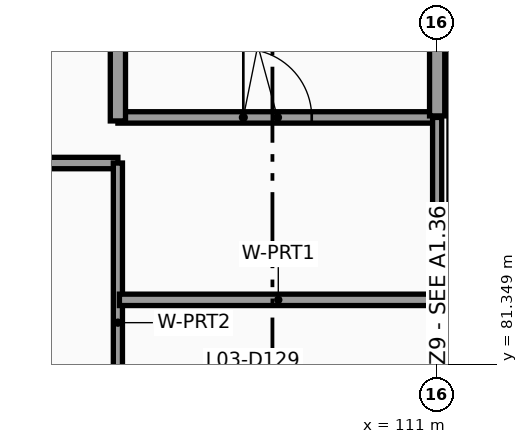
"""IFC4 building model, lengths in metres.
Left out: names, types, materials, properties, quantities, classifications, styles, units other than length and angle.
Written with IfcOpenShell. Run it as: python <this file> out.ifc"""

import sys

from ifc_helpers import new_model, si_unit, direction, frame, frame_2d, origin, place, context, subcontext, project, spatial, rectangle, extrude, element, fill, save


model = new_model("IFC4")
c1 = context("Model", 3, precision=1e-05, world=origin(), true_north=direction((0.0, 1.0)))
c2 = subcontext(c1, "Body", "Model", "MODEL_VIEW")
j1 = project(units=[si_unit("LENGTHUNIT", "METRE"), si_unit("PLANEANGLEUNIT", "RADIAN")], contexts=[c1])
p1 = place(None, origin())
s1 = spatial("IfcSite", under=j1, at=p1, CompositionType="ELEMENT")
p2 = place(p1, origin())
s2 = spatial("IfcBuilding", under=s1, at=p2, CompositionType="ELEMENT")
p3 = place(p2, frame((0.0, 0.0, 11.4)))
s3 = spatial("IfcBuildingStorey", under=s2, at=p3, CompositionType="ELEMENT", Elevation=11.4)
p4 = place(p3, frame((102.6, 84.0, 0.0), z_axis=(0.0, 0.0, 1.0), x_axis=(1.0, 0.0, 0.0)))
e1 = element("IfcWall", 1, at=p4, inside=s3, PredefinedType="PARTITIONING", context=c2, shape_type="SweptSolid", body=[
    extrude(rectangle(XDim=4.2, YDim=0.15, at=frame_2d((2.1, 0.0))), origin(), (0.0, 0.0, 1.0), 2.94),
])
p5 = place(p4, frame((1.15, 0.0, 0.0)))
e2 = element("IfcOpeningElement", 2, at=p5, cuts=e1, PredefinedType="OPENING", context=c2, shape_type="SweptSolid", body=[
    extrude(rectangle(XDim=1.9, YDim=2.3, at=frame_2d((0.95, 1.15))), frame((0.0, 0.085, 0.0), z_axis=(0.0, -1.0, 0.0), x_axis=(1.0, 0.0, 0.0)), (0.0, 0.0, 1.0), 0.17),
])
p6 = place(p3, frame((106.8, 84.0, 0.0), z_axis=(0.0, 0.0, 1.0), x_axis=(0.0, -1.0, 0.0)))
e3 = element("IfcWall", 3, at=p6, inside=s3, PredefinedType="PARTITIONING", context=c2, shape_type="SweptSolid", body=[
    extrude(rectangle(XDim=4.2, YDim=0.12, at=frame_2d((2.1, 0.0))), origin(), (0.0, 0.0, 1.0), 2.59),
])
p7 = place(p3, frame((106.82, 82.2, 0.0), z_axis=(0.0, 0.0, 1.0), x_axis=(1.0, 0.0, 0.0)))
e4 = element("IfcWall", 4, at=p7, inside=s3, PredefinedType="PARTITIONING", context=c2, shape_type="SweptSolid", body=[
    extrude(rectangle(XDim=4.18, YDim=0.15, at=frame_2d((2.09, 0.0))), origin(), (0.0, 0.0, 1.0), 2.98),
])
p8 = place(p3, frame((111.0, 82.2, 0.0), z_axis=(0.0, 0.0, 1.0), x_axis=(0.0, -1.0, 0.0)))
e5 = element("IfcWall", 5, at=p8, inside=s3, PredefinedType="PARTITIONING", context=c2, shape_type="SweptSolid", body=[
    extrude(rectangle(XDim=2.127, YDim=0.12, at=frame_2d((1.063, 0.0))), origin(), (0.0, 0.0, 1.0), 2.98),
])
p9 = place(p3, frame((106.8, 84.6, 0.0), z_axis=(0.0, 0.0, 1.0), x_axis=(1.0, 0.0, 0.0)))
e6 = element("IfcWall", 6, at=p9, inside=s3, PredefinedType="PARTITIONING", context=c2, shape_type="SweptSolid", body=[
    extrude(rectangle(XDim=4.2, YDim=0.15, at=frame_2d((2.1, 0.0))), origin(), (0.0, 0.0, 1.0), 2.98),
])
p10 = place(p9, frame((1.65, 0.0, 0.0)))
e7 = element("IfcOpeningElement", 7, at=p10, cuts=e6, PredefinedType="OPENING", context=c2, shape_type="SweptSolid", body=[
    extrude(rectangle(XDim=0.9, YDim=2.05, at=frame_2d((0.45, 1.025))), frame((0.0, 0.085, 0.0), z_axis=(0.0, -1.0, 0.0), x_axis=(1.0, 0.0, 0.0)), (0.0, 0.0, 1.0), 0.17),
])
p11 = place(p3, frame((111.0, 84.6, 0.0), z_axis=(0.0, 0.0, 1.0), x_axis=(0.0, -1.0, 0.0)))
e8 = element("IfcWall", 8, at=p11, inside=s3, PredefinedType="PARTITIONING", context=c2, shape_type="SweptSolid", body=[
    extrude(rectangle(XDim=2.38, YDim=0.12, at=frame_2d((1.19, 0.0))), origin(), (0.0, 0.0, 1.0), 2.98),
])
p12 = place(p3, frame((106.8, 88.2, 0.0), z_axis=(0.0, 0.0, 1.0), x_axis=(0.0, -1.0, 0.0)))
e9 = element("IfcWall", 9, at=p12, inside=s3, PredefinedType="PARTITIONING", context=c2, shape_type="SweptSolid", body=[
    extrude(rectangle(XDim=3.646, YDim=0.2, at=frame_2d((1.823, 0.0))), origin(), (0.0, 0.0, 1.0), 2.69),
])
p13 = place(p3, frame((111.0, 87.927, 0.0), z_axis=(0.0, 0.0, 1.0), x_axis=(0.0, -1.0, 0.0)))
e10 = element("IfcWall", 10, at=p13, inside=s3, PredefinedType="PARTITIONING", context=c2, shape_type="SweptSolid", body=[
    extrude(rectangle(XDim=3.307, YDim=0.2, at=frame_2d((1.653, 0.0))), origin(), (0.0, 0.0, 1.0), 2.98),
])
p14 = place(p10, origin())
e11 = element("IfcDoor", 11, at=p14, inside=s3, OperationType="SINGLE_SWING_LEFT", PredefinedType="DOOR", context=c2, shape_type="SweptSolid", body=[
    extrude(rectangle(XDim=0.9, YDim=2.05, at=frame_2d((0.45, 1.025))), frame((0.0, 0.025, 0.0), z_axis=(0.0, -1.0, 0.0), x_axis=(1.0, 0.0, 0.0)), (0.0, 0.0, 1.0), 0.05),
])
fill(e7, e11)
save(model, sys.argv[1])
